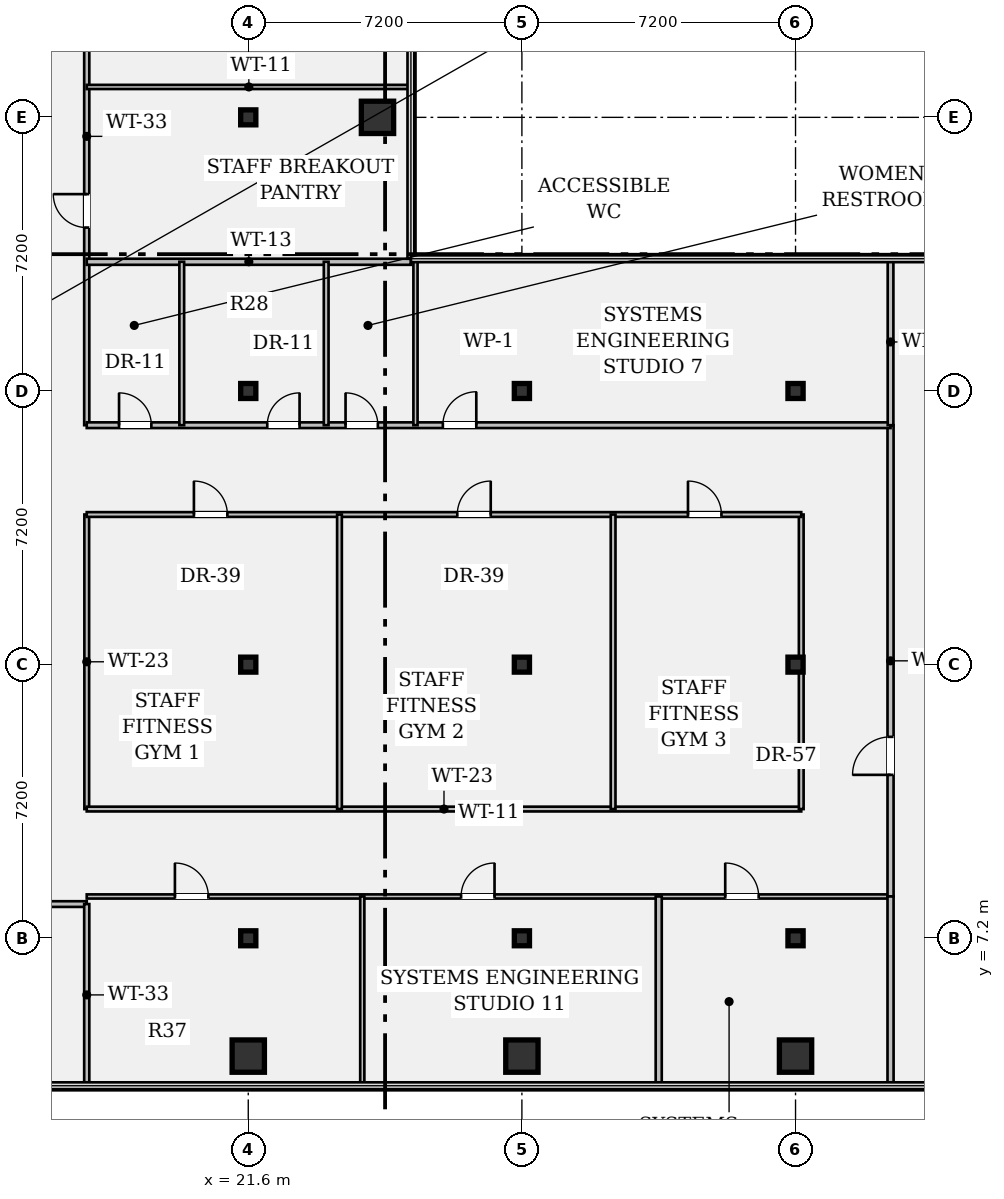
"""IFC4 building model, lengths in metres.
Left out: names, types, materials, properties, quantities, classifications, styles, units other than length and angle.
Written with IfcOpenShell. Run it as: python <this file> out.ifc"""

import sys

from ifc_helpers import new_model, si_unit, direction, frame, frame_2d, origin, origin_2d, place, context, subcontext, project, spatial, rectangle, hollow_rectangle, i_section, extrude, element, fill, save


model = new_model("IFC4")
c1 = context("Model", 3, precision=1e-05, world=origin(), true_north=direction((0.0, 1.0)))
c2 = subcontext(c1, "Body", "Model", "MODEL_VIEW")
j1 = project(units=[si_unit("LENGTHUNIT", "METRE"), si_unit("PLANEANGLEUNIT", "RADIAN")], contexts=[c1])
p1 = place(None, origin())
s1 = spatial("IfcSite", under=j1, at=p1, CompositionType="ELEMENT")
p2 = place(p1, origin())
s2 = spatial("IfcBuilding", under=s1, at=p2, CompositionType="ELEMENT")
p3 = place(p2, frame((0.0, 0.0, 152.25)))
s3 = spatial("IfcBuildingStorey", under=s2, at=p3, CompositionType="ELEMENT", Elevation=152.25)
p4 = place(p3, frame((21.6, 4.1, 0.0), z_axis=(0.0, 0.0, 1.0), x_axis=(1.0, 0.0, 0.0)))
e1 = element("IfcColumn", 1, at=p4, inside=s3, PredefinedType="COLUMN", context=c2, shape_type="SweptSolid", body=[
    extrude(hollow_rectangle(XDim=0.85, YDim=0.85, WallThickness=0.05, at=origin_2d()), origin(), (0.0, 0.0, 1.0), 3.58),
])
for number, where, z_axis, x_axis in (
    (2, (21.6, 7.2, 0.0), (0.0, 0.0, 1.0), (1.0, 0.0, 0.0)),
    (3, (21.6, 14.4, 0.0), (0.0, 0.0, 1.0), (1.0, 0.0, 0.0)),
    (4, (21.6, 21.6, 0.0), (0.0, 0.0, 1.0), (1.0, 0.0, 0.0)),
    (5, (21.6, 28.8, 0.0), (0.0, 0.0, 1.0), (1.0, 0.0, 0.0)),
):
    element("IfcColumn", number, at=place(p3, frame(where, z_axis=z_axis, x_axis=x_axis)), inside=s3, PredefinedType="COLUMN", context=c2, shape_type="SweptSolid", body=[
        extrude(i_section(OverallWidth=0.399, OverallDepth=0.394, WebThickness=0.023, FlangeThickness=0.037, FilletRadius=0.018, at=origin_2d()), origin(), (0.0, 0.0, 1.0), 3.58),
    ])
for number, where, z_axis, x_axis in (
    (6, (25.0, 28.8, 0.0), (0.0, 0.0, 1.0), (1.0, 0.0, 0.0)),
    (7, (28.8, 4.1, 0.0), (0.0, 0.0, 1.0), (1.0, 0.0, 0.0)),
):
    element("IfcColumn", number, at=place(p3, frame(where, z_axis=z_axis, x_axis=x_axis)), inside=s3, PredefinedType="COLUMN", context=c2, shape_type="SweptSolid", body=[
        extrude(hollow_rectangle(XDim=0.85, YDim=0.85, WallThickness=0.05, at=origin_2d()), origin(), (0.0, 0.0, 1.0), 3.58),
    ])
for number, where, z_axis, x_axis in (
    (8, (28.8, 7.2, 0.0), (0.0, 0.0, 1.0), (1.0, 0.0, 0.0)),
    (9, (28.8, 14.4, 0.0), (0.0, 0.0, 1.0), (1.0, 0.0, 0.0)),
    (10, (28.8, 21.6, 0.0), (0.0, 0.0, 1.0), (1.0, 0.0, 0.0)),
):
    element("IfcColumn", number, at=place(p3, frame(where, z_axis=z_axis, x_axis=x_axis)), inside=s3, PredefinedType="COLUMN", context=c2, shape_type="SweptSolid", body=[
        extrude(i_section(OverallWidth=0.399, OverallDepth=0.394, WebThickness=0.023, FlangeThickness=0.037, FilletRadius=0.018, at=origin_2d()), origin(), (0.0, 0.0, 1.0), 3.58),
    ])
p5 = place(p3, frame((36.0, 4.1, 0.0), z_axis=(0.0, 0.0, 1.0), x_axis=(1.0, 0.0, 0.0)))
e11 = element("IfcColumn", 11, at=p5, inside=s3, PredefinedType="COLUMN", context=c2, shape_type="SweptSolid", body=[
    extrude(hollow_rectangle(XDim=0.85, YDim=0.85, WallThickness=0.05, at=origin_2d()), origin(), (0.0, 0.0, 1.0), 3.58),
])
for number, where, z_axis, x_axis in (
    (12, (36.0, 7.2, 0.0), (0.0, 0.0, 1.0), (1.0, 0.0, 0.0)),
    (13, (36.0, 14.4, 0.0), (0.0, 0.0, 1.0), (1.0, 0.0, 0.0)),
    (14, (36.0, 21.6, 0.0), (0.0, 0.0, 1.0), (1.0, 0.0, 0.0)),
):
    element("IfcColumn", number, at=place(p3, frame(where, z_axis=z_axis, x_axis=x_axis)), inside=s3, PredefinedType="COLUMN", context=c2, shape_type="SweptSolid", body=[
        extrude(i_section(OverallWidth=0.399, OverallDepth=0.394, WebThickness=0.023, FlangeThickness=0.037, FilletRadius=0.018, at=origin_2d()), origin(), (0.0, 0.0, 1.0), 3.58),
    ])
p6 = place(p3, frame((14.4, 8.1, 0.0), z_axis=(0.0, 0.0, 1.0), x_axis=(1.0, 0.0, 0.0)))
e15 = element("IfcWall", 15, at=p6, inside=s3, PredefinedType="PARTITIONING", context=c2, shape_type="SweptSolid", body=[
    extrude(rectangle(XDim=2.95, YDim=0.15, at=frame_2d((1.475, 0.0))), origin(), (0.0, 0.0, 1.0), 3.148),
])
p7 = place(p6, frame((0.95, 0.0, 0.0)))
e16 = element("IfcOpeningElement", 16, at=p7, cuts=e15, PredefinedType="OPENING", context=c2, shape_type="SweptSolid", body=[
    extrude(rectangle(XDim=0.88, YDim=2.15, at=frame_2d((0.44, 1.075))), frame((0.0, 0.087, 0.0), z_axis=(0.0, -1.0, 0.0), x_axis=(1.0, 0.0, 0.0)), (0.0, 0.0, 1.0), 0.174),
])
p8 = place(p3, frame((17.35, 20.7, 0.0), z_axis=(0.0, 0.0, 1.0), x_axis=(0.0, 1.0, 0.0)))
e17 = element("IfcWall", 17, at=p8, inside=s3, PredefinedType="PARTITIONING", context=c2, shape_type="SweptSolid", body=[
    extrude(rectangle(XDim=15.2, YDim=0.135, at=frame_2d((7.6, 0.0))), origin(), (0.0, 0.0, 1.0), 2.869),
])
p9 = place(p8, frame((5.2, 0.0, 0.0)))
e18 = element("IfcOpeningElement", 18, at=p9, cuts=e17, PredefinedType="OPENING", context=c2, shape_type="SweptSolid", body=[
    extrude(rectangle(XDim=0.88, YDim=2.15, at=frame_2d((0.44, 1.075))), frame((0.0, 0.08, 0.0), z_axis=(0.0, -1.0, 0.0), x_axis=(1.0, 0.0, 0.0)), (0.0, 0.0, 1.0), 0.159),
])
p10 = place(p8, frame((10.6, 0.0, 0.0)))
e19 = element("IfcOpeningElement", 19, at=p10, cuts=e17, PredefinedType="OPENING", context=c2, shape_type="SweptSolid", body=[
    extrude(rectangle(XDim=1.0, YDim=2.15, at=frame_2d((0.5, 1.075))), frame((0.0, 0.08, 0.0), z_axis=(0.0, -1.0, 0.0), x_axis=(1.0, 0.0, 0.0)), (0.0, 0.0, 1.0), 0.159),
])
p11 = place(p3, frame((17.35, 8.3, 0.0), z_axis=(0.0, 0.0, 1.0), x_axis=(1.0, 0.0, 0.0)))
e20 = element("IfcWall", 20, at=p11, inside=s3, PredefinedType="PARTITIONING", context=c2, shape_type="SweptSolid", body=[
    extrude(rectangle(XDim=21.15, YDim=0.11, at=frame_2d((10.575, 0.0))), origin(), (0.0, 0.0, 1.0), 2.869),
])
p12 = place(p11, frame((2.32, 0.0, 0.0)))
e21 = element("IfcOpeningElement", 21, at=p12, cuts=e20, PredefinedType="OPENING", context=c2, shape_type="SweptSolid", body=[
    extrude(rectangle(XDim=0.88, YDim=2.15, at=frame_2d((0.44, 1.075))), frame((0.0, 0.067, 0.0), z_axis=(0.0, -1.0, 0.0), x_axis=(1.0, 0.0, 0.0)), (0.0, 0.0, 1.0), 0.134),
])
p13 = place(p11, frame((9.85, 0.0, 0.0)))
e22 = element("IfcOpeningElement", 22, at=p13, cuts=e20, PredefinedType="OPENING", context=c2, shape_type="SweptSolid", body=[
    extrude(rectangle(XDim=0.88, YDim=2.15, at=frame_2d((0.44, 1.075))), frame((0.0, 0.067, 0.0), z_axis=(0.0, -1.0, 0.0), x_axis=(1.0, 0.0, 0.0)), (0.0, 0.0, 1.0), 0.134),
])
p14 = place(p11, frame((16.8, 0.0, 0.0)))
e23 = element("IfcOpeningElement", 23, at=p14, cuts=e20, PredefinedType="OPENING", context=c2, shape_type="SweptSolid", body=[
    extrude(rectangle(XDim=0.88, YDim=2.15, at=frame_2d((0.44, 1.075))), frame((0.0, 0.067, 0.0), z_axis=(0.0, -1.0, 0.0), x_axis=(1.0, 0.0, 0.0)), (0.0, 0.0, 1.0), 0.134),
])
p15 = place(p3, frame((38.5, 8.3, 0.0), z_axis=(0.0, 0.0, 1.0), x_axis=(0.0, 1.0, 0.0)))
e24 = element("IfcWall", 24, at=p15, inside=s3, PredefinedType="PARTITIONING", context=c2, shape_type="SweptSolid", body=[
    extrude(rectangle(XDim=12.4, YDim=0.16, at=frame_2d((6.2, 0.0))), origin(), (0.0, 0.0, 1.0), 2.165),
])
p16 = place(p15, frame((3.2, 0.0, 0.0)))
e25 = element("IfcOpeningElement", 25, at=p16, cuts=e24, PredefinedType="OPENING", context=c2, shape_type="SweptSolid", body=[
    extrude(rectangle(XDim=1.0, YDim=2.02, at=frame_2d((0.5, 1.01))), frame((0.0, 0.092, 0.0), z_axis=(0.0, -1.0, 0.0), x_axis=(1.0, 0.0, 0.0)), (0.0, 0.0, 1.0), 0.184),
])
p17 = place(p3, frame((17.35, 20.7, 0.0), z_axis=(0.0, 0.0, 1.0), x_axis=(1.0, 0.0, 0.0)))
e26 = element("IfcWall", 26, at=p17, inside=s3, PredefinedType="PARTITIONING", context=c2, shape_type="SweptSolid", body=[
    extrude(rectangle(XDim=21.15, YDim=0.15, at=frame_2d((10.575, 0.0))), origin(), (0.0, 0.0, 1.0), 2.869),
])
p18 = place(p17, frame((0.85, 0.0, 0.0)))
e27 = element("IfcOpeningElement", 27, at=p18, cuts=e26, PredefinedType="OPENING", context=c2, shape_type="SweptSolid", body=[
    extrude(rectangle(XDim=0.85, YDim=2.15, at=frame_2d((0.425, 1.075))), frame((0.0, 0.087, 0.0), z_axis=(0.0, -1.0, 0.0), x_axis=(1.0, 0.0, 0.0)), (0.0, 0.0, 1.0), 0.174),
])
p19 = place(p17, frame((4.75, 0.0, 0.0)))
e28 = element("IfcOpeningElement", 28, at=p19, cuts=e26, PredefinedType="OPENING", context=c2, shape_type="SweptSolid", body=[
    extrude(rectangle(XDim=0.85, YDim=2.15, at=frame_2d((0.425, 1.075))), frame((0.0, 0.087, 0.0), z_axis=(0.0, -1.0, 0.0), x_axis=(1.0, 0.0, 0.0)), (0.0, 0.0, 1.0), 0.174),
])
p20 = place(p17, frame((6.81, 0.0, 0.0)))
e29 = element("IfcOpeningElement", 29, at=p20, cuts=e26, PredefinedType="OPENING", context=c2, shape_type="SweptSolid", body=[
    extrude(rectangle(XDim=0.85, YDim=2.15, at=frame_2d((0.425, 1.075))), frame((0.0, 0.087, 0.0), z_axis=(0.0, -1.0, 0.0), x_axis=(1.0, 0.0, 0.0)), (0.0, 0.0, 1.0), 0.174),
])
p21 = place(p17, frame((9.37, 0.0, 0.0)))
e30 = element("IfcOpeningElement", 30, at=p21, cuts=e26, PredefinedType="OPENING", context=c2, shape_type="SweptSolid", body=[
    extrude(rectangle(XDim=0.88, YDim=2.15, at=frame_2d((0.44, 1.075))), frame((0.0, 0.087, 0.0), z_axis=(0.0, -1.0, 0.0), x_axis=(1.0, 0.0, 0.0)), (0.0, 0.0, 1.0), 0.174),
])
p22 = place(p3, frame((17.35, 10.6, 0.0), z_axis=(0.0, 0.0, 1.0), x_axis=(0.0, 1.0, 0.0)))
e31 = element("IfcWall", 31, at=p22, inside=s3, PredefinedType="PARTITIONING", context=c2, shape_type="SweptSolid", body=[
    extrude(rectangle(XDim=7.75, YDim=0.125, at=frame_2d((3.875, 0.0))), origin(), (0.0, 0.0, 1.0), 2.869),
])
p23 = place(p3, frame((17.35, 10.6, 0.0), z_axis=(0.0, 0.0, 1.0), x_axis=(1.0, 0.0, 0.0)))
e32 = element("IfcWall", 32, at=p23, inside=s3, PredefinedType="PARTITIONING", context=c2, shape_type="SweptSolid", body=[
    extrude(rectangle(XDim=18.8, YDim=0.125, at=frame_2d((9.4, 0.0))), origin(), (0.0, 0.0, 1.0), 2.869),
])
p24 = place(p3, frame((36.15, 10.6, 0.0), z_axis=(0.0, 0.0, 1.0), x_axis=(0.0, 1.0, 0.0)))
e33 = element("IfcWall", 33, at=p24, inside=s3, PredefinedType="PARTITIONING", context=c2, shape_type="SweptSolid", body=[
    extrude(rectangle(XDim=7.75, YDim=0.125, at=frame_2d((3.875, 0.0))), origin(), (0.0, 0.0, 1.0), 2.165),
])
p25 = place(p3, frame((17.35, 18.35, 0.0), z_axis=(0.0, 0.0, 1.0), x_axis=(1.0, 0.0, 0.0)))
e34 = element("IfcWall", 34, at=p25, inside=s3, PredefinedType="PARTITIONING", context=c2, shape_type="SweptSolid", body=[
    extrude(rectangle(XDim=18.8, YDim=0.125, at=frame_2d((9.4, 0.0))), origin(), (0.0, 0.0, 1.0), 2.869),
])
p26 = place(p25, frame((2.82, 0.0, 0.0)))
e35 = element("IfcOpeningElement", 35, at=p26, cuts=e34, PredefinedType="OPENING", context=c2, shape_type="SweptSolid", body=[
    extrude(rectangle(XDim=0.88, YDim=2.15, at=frame_2d((0.44, 1.075))), frame((0.0, 0.074, 0.0), z_axis=(0.0, -1.0, 0.0), x_axis=(1.0, 0.0, 0.0)), (0.0, 0.0, 1.0), 0.149),
])
p27 = place(p25, frame((9.75, 0.0, 0.0)))
e36 = element("IfcOpeningElement", 36, at=p27, cuts=e34, PredefinedType="OPENING", context=c2, shape_type="SweptSolid", body=[
    extrude(rectangle(XDim=0.88, YDim=2.15, at=frame_2d((0.44, 1.075))), frame((0.0, 0.074, 0.0), z_axis=(0.0, -1.0, 0.0), x_axis=(1.0, 0.0, 0.0)), (0.0, 0.0, 1.0), 0.149),
])
p28 = place(p25, frame((15.82, 0.0, 0.0)))
e37 = element("IfcOpeningElement", 37, at=p28, cuts=e34, PredefinedType="OPENING", context=c2, shape_type="SweptSolid", body=[
    extrude(rectangle(XDim=0.88, YDim=2.15, at=frame_2d((0.44, 1.075))), frame((0.0, 0.074, 0.0), z_axis=(0.0, -1.0, 0.0), x_axis=(1.0, 0.0, 0.0)), (0.0, 0.0, 1.0), 0.149),
])
for number, where, z_axis, x_axis in (
    (38, (24.0, 10.6, 0.0), (0.0, 0.0, 1.0), (0.0, 1.0, 0.0)),
    (39, (31.2, 10.6, 0.0), (0.0, 0.0, 1.0), (0.0, 1.0, 0.0)),
):
    element("IfcWall", number, at=place(p3, frame(where, z_axis=z_axis, x_axis=x_axis)), inside=s3, PredefinedType="PARTITIONING", context=c2, shape_type="SweptSolid", body=[
        extrude(rectangle(XDim=7.75, YDim=0.125, at=frame_2d((3.875, 0.0))), origin(), (0.0, 0.0, 1.0), 2.869),
    ])
p29 = place(p3, frame((17.35, 25.0, 0.0), z_axis=(0.0, 0.0, 1.0), x_axis=(1.0, 0.0, 0.0)))
e40 = element("IfcWall", 40, at=p29, inside=s3, PredefinedType="PARTITIONING", context=c2, shape_type="SweptSolid", body=[
    extrude(rectangle(XDim=8.53, YDim=0.16, at=frame_2d((4.265, 0.0))), origin(), (0.0, 0.0, 1.0), 2.869),
])
for number, where, z_axis, x_axis in (
    (41, (19.85, 20.7, 0.0), (0.0, 0.0, 1.0), (0.0, 1.0, 0.0)),
    (42, (23.65, 20.7, 0.0), (0.0, 0.0, 1.0), (0.0, 1.0, 0.0)),
):
    element("IfcWall", number, at=place(p3, frame(where, z_axis=z_axis, x_axis=x_axis)), inside=s3, PredefinedType="PARTITIONING", context=c2, shape_type="SweptSolid", body=[
        extrude(rectangle(XDim=4.3, YDim=0.125, at=frame_2d((2.15, 0.0))), origin(), (0.0, 0.0, 1.0), 2.869),
    ])
p30 = place(p3, frame((17.35, 29.6, 0.0), z_axis=(0.0, 0.0, 1.0), x_axis=(1.0, 0.0, 0.0)))
e43 = element("IfcWall", 43, at=p30, inside=s3, PredefinedType="PARTITIONING", context=c2, shape_type="SweptSolid", body=[
    extrude(rectangle(XDim=8.53, YDim=0.11, at=frame_2d((4.265, 0.0))), origin(), (0.0, 0.0, 1.0), 2.869),
])
p31 = place(p3, frame((26.0, 20.7, 0.0), z_axis=(0.0, 0.0, 1.0), x_axis=(0.0, 1.0, 0.0)))
e44 = element("IfcWall", 44, at=p31, inside=s3, PredefinedType="PARTITIONING", context=c2, shape_type="SweptSolid", body=[
    extrude(rectangle(XDim=4.38, YDim=0.11, at=frame_2d((2.19, 0.0))), origin(), (0.0, 0.0, 1.0), 2.869),
])
p32 = place(p3, frame((38.5, 3.32, 0.0), z_axis=(0.0, 0.0, 1.0), x_axis=(0.0, 1.0, 0.0)))
e45 = element("IfcWall", 45, at=p32, inside=s3, PredefinedType="PARTITIONING", context=c2, shape_type="SweptSolid", body=[
    extrude(rectangle(XDim=4.98, YDim=0.16, at=frame_2d((2.49, 0.0))), origin(), (0.0, 0.0, 1.0), 2.869),
])
p33 = place(p3, frame((38.5, 20.7, 0.0), z_axis=(0.0, 0.0, 1.0), x_axis=(0.0, 1.0, 0.0)))
e46 = element("IfcWall", 46, at=p33, inside=s3, PredefinedType="PARTITIONING", context=c2, shape_type="SweptSolid", body=[
    extrude(rectangle(XDim=4.38, YDim=0.15, at=frame_2d((2.19, 0.0))), origin(), (0.0, 0.0, 1.0), 2.165),
])
p34 = place(p3, frame((17.35, 3.32, 0.0), z_axis=(0.0, 0.0, 1.0), x_axis=(0.0, 1.0, 0.0)))
e47 = element("IfcWall", 47, at=p34, inside=s3, PredefinedType="PARTITIONING", context=c2, shape_type="SweptSolid", body=[
    extrude(rectangle(XDim=4.78, YDim=0.135, at=frame_2d((2.39, 0.0))), origin(), (0.0, 0.0, 1.0), 2.869),
])
p35 = place(p3, frame((24.6, 3.32, 0.0), z_axis=(0.0, 0.0, 1.0), x_axis=(0.0, 1.0, 0.0)))
e48 = element("IfcWall", 48, at=p35, inside=s3, PredefinedType="PARTITIONING", context=c2, shape_type="SweptSolid", body=[
    extrude(rectangle(XDim=4.98, YDim=0.11, at=frame_2d((2.49, 0.0))), origin(), (0.0, 0.0, 1.0), 2.869),
])
p36 = place(p3, frame((32.4, 3.32, 0.0), z_axis=(0.0, 0.0, 1.0), x_axis=(0.0, 1.0, 0.0)))
e49 = element("IfcWall", 49, at=p36, inside=s3, PredefinedType="PARTITIONING", context=c2, shape_type="SweptSolid", body=[
    extrude(rectangle(XDim=4.98, YDim=0.16, at=frame_2d((2.49, 0.0))), origin(), (0.0, 0.0, 1.0), 2.869),
])
p37 = place(p26, origin())
e50 = element("IfcDoor", 50, at=p37, inside=s3, OperationType="SINGLE_SWING_LEFT", PredefinedType="DOOR", context=c2, shape_type="SweptSolid", body=[
    extrude(rectangle(XDim=0.88, YDim=2.15, at=frame_2d((0.44, 1.075))), frame((0.0, 0.025, 0.0), z_axis=(0.0, -1.0, 0.0), x_axis=(1.0, 0.0, 0.0)), (0.0, 0.0, 1.0), 0.05),
])
fill(e35, e50)
p38 = place(p27, origin())
e51 = element("IfcDoor", 51, at=p38, inside=s3, OperationType="SINGLE_SWING_RIGHT", PredefinedType="DOOR", context=c2, shape_type="SweptSolid", body=[
    extrude(rectangle(XDim=0.88, YDim=2.15, at=frame_2d((0.44, 1.075))), frame((0.0, 0.025, 0.0), z_axis=(0.0, -1.0, 0.0), x_axis=(1.0, 0.0, 0.0)), (0.0, 0.0, 1.0), 0.05),
])
fill(e36, e51)
p39 = place(p28, origin())
e52 = element("IfcDoor", 52, at=p39, inside=s3, OperationType="SINGLE_SWING_LEFT", PredefinedType="DOOR", context=c2, shape_type="SweptSolid", body=[
    extrude(rectangle(XDim=0.88, YDim=2.15, at=frame_2d((0.44, 1.075))), frame((0.0, 0.025, 0.0), z_axis=(0.0, -1.0, 0.0), x_axis=(1.0, 0.0, 0.0)), (0.0, 0.0, 1.0), 0.05),
])
fill(e37, e52)
p40 = place(p18, origin())
e53 = element("IfcDoor", 53, at=p40, inside=s3, OperationType="SINGLE_SWING_LEFT", PredefinedType="DOOR", context=c2, shape_type="SweptSolid", body=[
    extrude(rectangle(XDim=0.85, YDim=2.15, at=frame_2d((0.425, 1.075))), frame((0.0, 0.025, 0.0), z_axis=(0.0, -1.0, 0.0), x_axis=(1.0, 0.0, 0.0)), (0.0, 0.0, 1.0), 0.05),
])
fill(e27, e53)
p41 = place(p19, origin())
e54 = element("IfcDoor", 54, at=p41, inside=s3, OperationType="SINGLE_SWING_RIGHT", PredefinedType="DOOR", context=c2, shape_type="SweptSolid", body=[
    extrude(rectangle(XDim=0.85, YDim=2.15, at=frame_2d((0.425, 1.075))), frame((0.0, 0.025, 0.0), z_axis=(0.0, -1.0, 0.0), x_axis=(1.0, 0.0, 0.0)), (0.0, 0.0, 1.0), 0.05),
])
fill(e28, e54)
p42 = place(p20, origin())
e55 = element("IfcDoor", 55, at=p42, inside=s3, OperationType="SINGLE_SWING_LEFT", PredefinedType="DOOR", context=c2, shape_type="SweptSolid", body=[
    extrude(rectangle(XDim=0.85, YDim=2.15, at=frame_2d((0.425, 1.075))), frame((0.0, 0.025, 0.0), z_axis=(0.0, -1.0, 0.0), x_axis=(1.0, 0.0, 0.0)), (0.0, 0.0, 1.0), 0.05),
])
fill(e29, e55)
p43 = place(p9, origin())
e56 = element("IfcDoor", 56, at=p43, inside=s3, OperationType="SINGLE_SWING_RIGHT", PredefinedType="DOOR", context=c2, shape_type="SweptSolid", body=[
    extrude(rectangle(XDim=0.88, YDim=2.15, at=frame_2d((0.44, 1.075))), frame((0.0, 0.025, 0.0), z_axis=(0.0, -1.0, 0.0), x_axis=(1.0, 0.0, 0.0)), (0.0, 0.0, 1.0), 0.05),
])
fill(e18, e56)
p44 = place(p21, origin())
e57 = element("IfcDoor", 57, at=p44, inside=s3, OperationType="SINGLE_SWING_RIGHT", PredefinedType="DOOR", context=c2, shape_type="SweptSolid", body=[
    extrude(rectangle(XDim=0.88, YDim=2.15, at=frame_2d((0.44, 1.075))), frame((0.0, 0.025, 0.0), z_axis=(0.0, -1.0, 0.0), x_axis=(1.0, 0.0, 0.0)), (0.0, 0.0, 1.0), 0.05),
])
fill(e30, e57)
p45 = place(p16, origin())
e58 = element("IfcDoor", 58, at=p45, inside=s3, OperationType="SINGLE_SWING_LEFT", PredefinedType="DOOR", context=c2, shape_type="SweptSolid", body=[
    extrude(rectangle(XDim=1.0, YDim=2.02, at=frame_2d((0.5, 1.01))), frame((0.0, 0.025, 0.0), z_axis=(0.0, -1.0, 0.0), x_axis=(1.0, 0.0, 0.0)), (0.0, 0.0, 1.0), 0.05),
])
fill(e25, e58)
p46 = place(p12, origin())
e59 = element("IfcDoor", 59, at=p46, inside=s3, OperationType="SINGLE_SWING_LEFT", PredefinedType="DOOR", context=c2, shape_type="SweptSolid", body=[
    extrude(rectangle(XDim=0.88, YDim=2.15, at=frame_2d((0.44, 1.075))), frame((0.0, 0.025, 0.0), z_axis=(0.0, -1.0, 0.0), x_axis=(1.0, 0.0, 0.0)), (0.0, 0.0, 1.0), 0.05),
])
fill(e21, e59)
p47 = place(p13, origin())
e60 = element("IfcDoor", 60, at=p47, inside=s3, OperationType="SINGLE_SWING_RIGHT", PredefinedType="DOOR", context=c2, shape_type="SweptSolid", body=[
    extrude(rectangle(XDim=0.88, YDim=2.15, at=frame_2d((0.44, 1.075))), frame((0.0, 0.025, 0.0), z_axis=(0.0, -1.0, 0.0), x_axis=(1.0, 0.0, 0.0)), (0.0, 0.0, 1.0), 0.05),
])
fill(e22, e60)
p48 = place(p14, origin())
e61 = element("IfcDoor", 61, at=p48, inside=s3, OperationType="SINGLE_SWING_LEFT", PredefinedType="DOOR", context=c2, shape_type="SweptSolid", body=[
    extrude(rectangle(XDim=0.88, YDim=2.15, at=frame_2d((0.44, 1.075))), frame((0.0, 0.025, 0.0), z_axis=(0.0, -1.0, 0.0), x_axis=(1.0, 0.0, 0.0)), (0.0, 0.0, 1.0), 0.05),
])
fill(e23, e61)
save(model, sys.argv[1])
